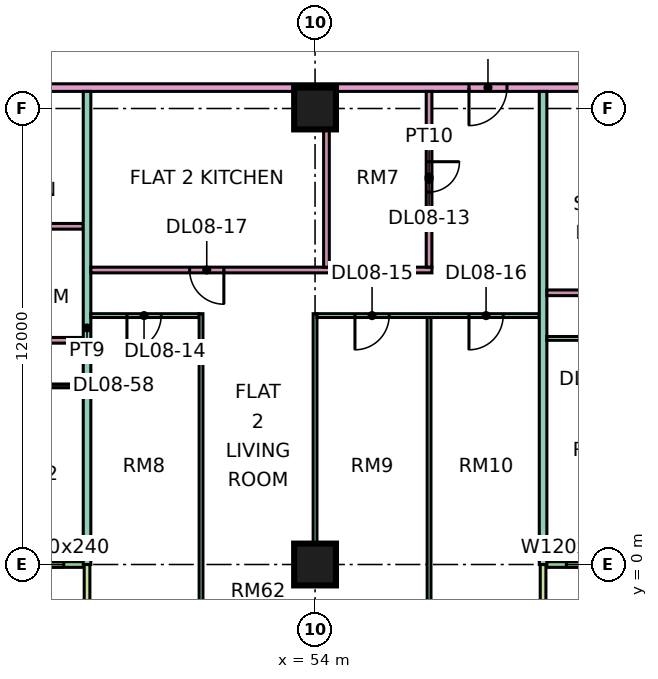
"""IFC4 building model, lengths in metres.
Left out: names, types, materials, properties, quantities, classifications, styles, units other than length and angle.
Written with IfcOpenShell. Run it as: python <this file> out.ifc"""

import sys

from ifc_helpers import new_model, si_unit, direction, frame, frame_2d, origin, origin_2d, place, context, subcontext, project, spatial, rectangle, extrude, element, fill, save


model = new_model("IFC4")
c1 = context("Model", 3, precision=1e-05, world=origin(), true_north=direction((0.0, 1.0)))
c2 = subcontext(c1, "Body", "Model", "MODEL_VIEW")
j1 = project(units=[si_unit("LENGTHUNIT", "METRE"), si_unit("PLANEANGLEUNIT", "RADIAN")], contexts=[c1])
p1 = place(None, origin())
s1 = spatial("IfcSite", under=j1, at=p1, CompositionType="ELEMENT")
p2 = place(p1, origin())
s2 = spatial("IfcBuilding", under=s1, at=p2, CompositionType="ELEMENT")
p3 = place(p2, frame((0.0, 0.0, 45.15)))
s3 = spatial("IfcBuildingStorey", under=s2, at=p3, CompositionType="ELEMENT", Elevation=45.15)
for number, where, z_axis, x_axis in (
    (1, (54.0, 0.0, 0.0), (0.0, 0.0, 1.0), (1.0, 0.0, 0.0)),
    (2, (54.0, 12.0, 0.0), (0.0, 0.0, 1.0), (1.0, 0.0, 0.0)),
):
    element("IfcColumn", number, at=place(p3, frame(where, z_axis=z_axis, x_axis=x_axis)), inside=s3, PredefinedType="COLUMN", context=c2, shape_type="SweptSolid", body=[
        extrude(rectangle(XDim=1.1, YDim=1.1, at=origin_2d()), origin(), (0.0, 0.0, 1.0), 3.75),
    ])
p4 = place(p3, frame((36.075, 0.0, 0.0), z_axis=(0.0, 0.0, 1.0), x_axis=(1.0, 0.0, 0.0)))
e3 = element("IfcWall", 3, at=p4, inside=s3, PredefinedType="SOLIDWALL", context=c2, shape_type="SweptSolid", body=[
    extrude(rectangle(XDim=11.85, YDim=0.15, at=frame_2d((5.925, 0.0))), origin(), (0.0, 0.0, 1.0), 3.35),
])
p5 = place(p4, frame((2.35, 0.0, 0.0)))
e4 = element("IfcOpeningElement", 4, at=p5, cuts=e3, PredefinedType="OPENING", context=c2, shape_type="SweptSolid", body=[
    extrude(rectangle(XDim=1.8, YDim=2.4, at=frame_2d((0.9, 1.2))), frame((0.0, 0.085, 0.0), z_axis=(0.0, -1.0, 0.0), x_axis=(1.0, 0.0, 0.0)), (0.0, 0.0, 1.0), 0.17),
])
p6 = place(p4, frame((6.5, 0.0, 0.45)))
e5 = element("IfcOpeningElement", 5, at=p6, cuts=e3, PredefinedType="OPENING", context=c2, shape_type="SweptSolid", body=[
    extrude(rectangle(XDim=1.2, YDim=2.4, at=frame_2d((0.6, 1.2))), frame((0.0, 0.085, 0.0), z_axis=(0.0, -1.0, 0.0), x_axis=(1.0, 0.0, 0.0)), (0.0, 0.0, 1.0), 0.17),
])
p7 = place(p4, frame((10.113, 0.0, 0.45)))
e6 = element("IfcOpeningElement", 6, at=p7, cuts=e3, PredefinedType="OPENING", context=c2, shape_type="SweptSolid", body=[
    extrude(rectangle(XDim=1.2, YDim=2.4, at=frame_2d((0.6, 1.2))), frame((0.0, 0.085, 0.0), z_axis=(0.0, -1.0, 0.0), x_axis=(1.0, 0.0, 0.0)), (0.0, 0.0, 1.0), 0.17),
])
p8 = place(p3, frame((48.0, -1.5, 0.0), z_axis=(0.0, 0.0, 1.0), x_axis=(0.0, 1.0, 0.0)))
e7 = element("IfcWall", 7, at=p8, inside=s3, PredefinedType="SOLIDWALL", context=c2, shape_type="SweptSolid", body=[
    extrude(rectangle(XDim=1.5, YDim=0.15, at=frame_2d((0.75, 0.0))), origin(), (0.0, 0.0, 1.0), 3.35),
])
p9 = place(p3, frame((60.075, 0.0, 0.0), z_axis=(0.0, 0.0, 1.0), x_axis=(1.0, 0.0, 0.0)))
e8 = element("IfcWall", 8, at=p9, inside=s3, PredefinedType="SOLIDWALL", context=c2, shape_type="SweptSolid", body=[
    extrude(rectangle(XDim=10.35, YDim=0.15, at=frame_2d((5.175, 0.0))), origin(), (0.0, 0.0, 1.0), 3.35),
])
p10 = place(p9, frame((0.538, 0.0, 0.45)))
e9 = element("IfcOpeningElement", 9, at=p10, cuts=e8, PredefinedType="OPENING", context=c2, shape_type="SweptSolid", body=[
    extrude(rectangle(XDim=1.2, YDim=2.4, at=frame_2d((0.6, 1.2))), frame((0.0, 0.085, 0.0), z_axis=(0.0, -1.0, 0.0), x_axis=(1.0, 0.0, 0.0)), (0.0, 0.0, 1.0), 0.17),
])
p11 = place(p9, frame((5.35, 0.0, 0.0)))
e10 = element("IfcOpeningElement", 10, at=p11, cuts=e8, PredefinedType="OPENING", context=c2, shape_type="SweptSolid", body=[
    extrude(rectangle(XDim=1.8, YDim=2.4, at=frame_2d((0.9, 1.2))), frame((0.0, 0.085, 0.0), z_axis=(0.0, -1.0, 0.0), x_axis=(1.0, 0.0, 0.0)), (0.0, 0.0, 1.0), 0.17),
])
p12 = place(p9, frame((9.188, 0.0, 0.45)))
e11 = element("IfcOpeningElement", 11, at=p12, cuts=e8, PredefinedType="OPENING", context=c2, shape_type="SweptSolid", body=[
    extrude(rectangle(XDim=0.9, YDim=2.4, at=frame_2d((0.45, 1.2))), frame((0.0, 0.085, 0.0), z_axis=(0.0, -1.0, 0.0), x_axis=(1.0, 0.0, 0.0)), (0.0, 0.0, 1.0), 0.17),
])
p13 = place(p3, frame((60.0, -1.5, 0.0), z_axis=(0.0, 0.0, 1.0), x_axis=(0.0, 1.0, 0.0)))
e12 = element("IfcWall", 12, at=p13, inside=s3, PredefinedType="SOLIDWALL", context=c2, shape_type="SweptSolid", body=[
    extrude(rectangle(XDim=1.5, YDim=0.15, at=frame_2d((0.75, 0.0))), origin(), (0.0, 0.0, 1.0), 3.35),
])
p14 = place(p3, frame((33.05, 4.7, 0.0), z_axis=(0.0, 0.0, 1.0), x_axis=(1.0, 0.0, 0.0)))
e13 = element("IfcWall", 13, at=p14, inside=s3, PredefinedType="PARTITIONING", context=c2, shape_type="SweptSolid", body=[
    extrude(rectangle(XDim=14.85, YDim=0.1, at=frame_2d((7.425, 0.0))), origin(), (0.0, 0.0, 1.0), 3.35),
])
p15 = place(p14, frame((10.0, 0.0, 0.0)))
e14 = element("IfcOpeningElement", 14, at=p15, cuts=e13, PredefinedType="OPENING", context=c2, shape_type="SweptSolid", body=[
    extrude(rectangle(XDim=0.9, YDim=2.1, at=frame_2d((0.45, 1.05))), frame((0.0, 0.06, 0.0), z_axis=(0.0, -1.0, 0.0), x_axis=(1.0, 0.0, 0.0)), (0.0, 0.0, 1.0), 0.12),
])
p16 = place(p14, frame((13.0, 0.0, 0.0)))
e15 = element("IfcOpeningElement", 15, at=p16, cuts=e13, PredefinedType="OPENING", context=c2, shape_type="SweptSolid", body=[
    extrude(rectangle(XDim=0.9, YDim=2.1, at=frame_2d((0.45, 1.05))), frame((0.0, 0.06, 0.0), z_axis=(0.0, -1.0, 0.0), x_axis=(1.0, 0.0, 0.0)), (0.0, 0.0, 1.0), 0.12),
])
p17 = place(p14, frame((4.0, 0.0, 0.0)))
e16 = element("IfcOpeningElement", 16, at=p17, cuts=e13, PredefinedType="OPENING", context=c2, shape_type="SweptSolid", body=[
    extrude(rectangle(XDim=0.9, YDim=2.1, at=frame_2d((0.45, 1.05))), frame((0.0, 0.06, 0.0), z_axis=(0.0, -1.0, 0.0), x_axis=(1.0, 0.0, 0.0)), (0.0, 0.0, 1.0), 0.12),
])
p18 = place(p3, frame((40.65, 12.55, 0.0), z_axis=(0.0, 0.0, 1.0), x_axis=(1.0, 0.0, 0.0)))
e17 = element("IfcWall", 17, at=p18, inside=s3, PredefinedType="PARTITIONING", context=c2, shape_type="SweptSolid", body=[
    extrude(rectangle(XDim=31.276, YDim=0.2, at=frame_2d((15.638, 0.0))), origin(), (0.0, 0.0, 1.0), 3.35),
])
p19 = place(p18, frame((17.4, 0.0, 0.0)))
e18 = element("IfcOpeningElement", 18, at=p19, cuts=e17, PredefinedType="OPENING", context=c2, shape_type="SweptSolid", body=[
    extrude(rectangle(XDim=1.0, YDim=2.1, at=frame_2d((0.5, 1.05))), frame((0.0, 0.11, 0.0), z_axis=(0.0, -1.0, 0.0), x_axis=(1.0, 0.0, 0.0)), (0.0, 0.0, 1.0), 0.22),
])
p20 = place(p18, frame((26.25, 0.0, 0.0)))
e19 = element("IfcOpeningElement", 19, at=p20, cuts=e17, PredefinedType="OPENING", context=c2, shape_type="SweptSolid", body=[
    extrude(rectangle(XDim=1.0, YDim=2.1, at=frame_2d((0.5, 1.05))), frame((0.0, 0.11, 0.0), z_axis=(0.0, -1.0, 0.0), x_axis=(1.0, 0.0, 0.0)), (0.0, 0.0, 1.0), 0.22),
])
p21 = place(p18, frame((1.05, 0.0, 0.0)))
e20 = element("IfcOpeningElement", 20, at=p21, cuts=e17, PredefinedType="OPENING", context=c2, shape_type="SweptSolid", body=[
    extrude(rectangle(XDim=1.0, YDim=2.1, at=frame_2d((0.5, 1.05))), frame((0.0, 0.11, 0.0), z_axis=(0.0, -1.0, 0.0), x_axis=(1.0, 0.0, 0.0)), (0.0, 0.0, 1.0), 0.22),
])
p22 = place(p3, frame((43.725, 5.9, 0.0), z_axis=(0.0, 0.0, 1.0), x_axis=(1.0, 0.0, 0.0)))
e21 = element("IfcWall", 21, at=p22, inside=s3, PredefinedType="PARTITIONING", context=c2, shape_type="SweptSolid", body=[
    extrude(rectangle(XDim=4.175, YDim=0.15, at=frame_2d((2.087, 0.0))), origin(), (0.0, 0.0, 1.0), 3.35),
])
p23 = place(p22, frame((1.675, 0.0, 0.0)))
e22 = element("IfcOpeningElement", 22, at=p23, cuts=e21, PredefinedType="OPENING", context=c2, shape_type="SweptSolid", body=[
    extrude(rectangle(XDim=0.8, YDim=2.1, at=frame_2d((0.4, 1.05))), frame((0.0, 0.085, 0.0), z_axis=(0.0, -1.0, 0.0), x_axis=(1.0, 0.0, 0.0)), (0.0, 0.0, 1.0), 0.17),
])
p24 = place(p3, frame((43.725, 8.9, 0.0), z_axis=(0.0, 0.0, 1.0), x_axis=(1.0, 0.0, 0.0)))
e23 = element("IfcWall", 23, at=p24, inside=s3, PredefinedType="PARTITIONING", context=c2, shape_type="SweptSolid", body=[
    extrude(rectangle(XDim=4.175, YDim=0.15, at=frame_2d((2.087, 0.0))), origin(), (0.0, 0.0, 1.0), 3.35),
])
p25 = place(p3, frame((48.0, 0.0, 0.0), z_axis=(0.0, 0.0, 1.0), x_axis=(0.0, 1.0, 0.0)))
e24 = element("IfcWall", 24, at=p25, inside=s3, PredefinedType="PARTITIONING", context=c2, shape_type="SweptSolid", body=[
    extrude(rectangle(XDim=12.45, YDim=0.2, at=frame_2d((6.225, 0.0))), origin(), (0.0, 0.0, 1.0), 3.35),
])
p26 = place(p3, frame((48.1, 6.55, 0.0), z_axis=(0.0, 0.0, 1.0), x_axis=(1.0, 0.0, 0.0)))
e25 = element("IfcWall", 25, at=p26, inside=s3, PredefinedType="PARTITIONING", context=c2, shape_type="SweptSolid", body=[
    extrude(rectangle(XDim=2.85, YDim=0.1, at=frame_2d((1.425, 0.0))), origin(), (0.0, 0.0, 1.0), 3.35),
])
p27 = place(p26, frame((0.95, 0.0, 0.0)))
e26 = element("IfcOpeningElement", 26, at=p27, cuts=e25, PredefinedType="OPENING", context=c2, shape_type="SweptSolid", body=[
    extrude(rectangle(XDim=0.9, YDim=2.1, at=frame_2d((0.45, 1.05))), frame((0.0, 0.06, 0.0), z_axis=(0.0, -1.0, 0.0), x_axis=(1.0, 0.0, 0.0)), (0.0, 0.0, 1.0), 0.12),
])
p28 = place(p3, frame((48.1, 7.75, 0.0), z_axis=(0.0, 0.0, 1.0), x_axis=(1.0, 0.0, 0.0)))
e27 = element("IfcWall", 27, at=p28, inside=s3, PredefinedType="PARTITIONING", context=c2, shape_type="SweptSolid", body=[
    extrude(rectangle(XDim=8.975, YDim=0.15, at=frame_2d((4.487, 0.0))), origin(), (0.0, 0.0, 1.0), 3.35),
])
p29 = place(p28, frame((2.6, 0.0, 0.0)))
e28 = element("IfcOpeningElement", 28, at=p29, cuts=e27, PredefinedType="OPENING", context=c2, shape_type="SweptSolid", body=[
    extrude(rectangle(XDim=0.9, YDim=2.1, at=frame_2d((0.45, 1.05))), frame((0.0, 0.085, 0.0), z_axis=(0.0, -1.0, 0.0), x_axis=(1.0, 0.0, 0.0)), (0.0, 0.0, 1.0), 0.17),
])
p30 = place(p3, frame((51.0, -1.35, 0.0), z_axis=(0.0, 0.0, 1.0), x_axis=(0.0, 1.0, 0.0)))
e29 = element("IfcWall", 29, at=p30, inside=s3, PredefinedType="PARTITIONING", context=c2, shape_type="SweptSolid", body=[
    extrude(rectangle(XDim=7.95, YDim=0.1, at=frame_2d((3.975, 0.0))), origin(), (0.0, 0.0, 1.0), 3.35),
])
p31 = place(p3, frame((54.0, 0.0, 0.0), z_axis=(0.0, 0.0, 1.0), x_axis=(0.0, 1.0, 0.0)))
e30 = element("IfcWall", 30, at=p31, inside=s3, PredefinedType="PARTITIONING", context=c2, shape_type="SweptSolid", body=[
    extrude(rectangle(XDim=6.6, YDim=0.1, at=frame_2d((3.3, 0.0))), origin(), (0.0, 0.0, 1.0), 3.35),
])
p32 = place(p3, frame((54.05, 6.55, 0.0), z_axis=(0.0, 0.0, 1.0), x_axis=(1.0, 0.0, 0.0)))
e31 = element("IfcWall", 31, at=p32, inside=s3, PredefinedType="PARTITIONING", context=c2, shape_type="SweptSolid", body=[
    extrude(rectangle(XDim=5.85, YDim=0.1, at=frame_2d((2.925, 0.0))), origin(), (0.0, 0.0, 1.0), 3.35),
])
p33 = place(p32, frame((1.0, 0.0, 0.0)))
e32 = element("IfcOpeningElement", 32, at=p33, cuts=e31, PredefinedType="OPENING", context=c2, shape_type="SweptSolid", body=[
    extrude(rectangle(XDim=0.9, YDim=2.1, at=frame_2d((0.45, 1.05))), frame((0.0, 0.06, 0.0), z_axis=(0.0, -1.0, 0.0), x_axis=(1.0, 0.0, 0.0)), (0.0, 0.0, 1.0), 0.12),
])
p34 = place(p32, frame((4.0, 0.0, 0.0)))
e33 = element("IfcOpeningElement", 33, at=p34, cuts=e31, PredefinedType="OPENING", context=c2, shape_type="SweptSolid", body=[
    extrude(rectangle(XDim=0.9, YDim=2.1, at=frame_2d((0.45, 1.05))), frame((0.0, 0.06, 0.0), z_axis=(0.0, -1.0, 0.0), x_axis=(1.0, 0.0, 0.0)), (0.0, 0.0, 1.0), 0.12),
])
p35 = place(p3, frame((54.3, 7.825, 0.0), z_axis=(0.0, 0.0, 1.0), x_axis=(0.0, 1.0, 0.0)))
e34 = element("IfcWall", 34, at=p35, inside=s3, PredefinedType="PARTITIONING", context=c2, shape_type="SweptSolid", body=[
    extrude(rectangle(XDim=4.625, YDim=0.15, at=frame_2d((2.312, 0.0))), origin(), (0.0, 0.0, 1.0), 3.35),
])
p36 = place(p3, frame((57.0, -1.351, 0.0), z_axis=(0.0, 0.0, 1.0), x_axis=(0.0, 1.0, 0.0)))
e35 = element("IfcWall", 35, at=p36, inside=s3, PredefinedType="PARTITIONING", context=c2, shape_type="SweptSolid", body=[
    extrude(rectangle(XDim=7.851, YDim=0.1, at=frame_2d((3.926, 0.0))), origin(), (0.0, 0.0, 1.0), 3.35),
])
p37 = place(p3, frame((57.0, 7.825, 0.0), z_axis=(0.0, 0.0, 1.0), x_axis=(0.0, 1.0, 0.0)))
e36 = element("IfcWall", 36, at=p37, inside=s3, PredefinedType="PARTITIONING", context=c2, shape_type="SweptSolid", body=[
    extrude(rectangle(XDim=4.625, YDim=0.15, at=frame_2d((2.312, 0.0))), origin(), (0.0, 0.0, 1.0), 3.35),
])
p38 = place(p37, frame((1.975, 0.0, 0.0)))
e37 = element("IfcOpeningElement", 37, at=p38, cuts=e36, PredefinedType="OPENING", context=c2, shape_type="SweptSolid", body=[
    extrude(rectangle(XDim=0.8, YDim=2.1, at=frame_2d((0.4, 1.05))), frame((0.0, 0.085, 0.0), z_axis=(0.0, -1.0, 0.0), x_axis=(1.0, 0.0, 0.0)), (0.0, 0.0, 1.0), 0.17),
])
p39 = place(p3, frame((60.0, 0.0, 0.0), z_axis=(0.0, 0.0, 1.0), x_axis=(0.0, 1.0, 0.0)))
e38 = element("IfcWall", 38, at=p39, inside=s3, PredefinedType="PARTITIONING", context=c2, shape_type="SweptSolid", body=[
    extrude(rectangle(XDim=12.45, YDim=0.2, at=frame_2d((6.225, 0.0))), origin(), (0.0, 0.0, 1.0), 3.35),
])
p40 = place(p3, frame((60.1, 5.95, 0.0), z_axis=(0.0, 0.0, 1.0), x_axis=(1.0, 0.0, 0.0)))
e39 = element("IfcWall", 39, at=p40, inside=s3, PredefinedType="PARTITIONING", context=c2, shape_type="SweptSolid", body=[
    extrude(rectangle(XDim=2.85, YDim=0.1, at=frame_2d((1.425, 0.0))), origin(), (0.0, 0.0, 1.0), 3.35),
])
p41 = place(p40, frame((0.95, 0.0, 0.0)))
e40 = element("IfcOpeningElement", 40, at=p41, cuts=e39, PredefinedType="OPENING", context=c2, shape_type="SweptSolid", body=[
    extrude(rectangle(XDim=0.9, YDim=2.1, at=frame_2d((0.45, 1.05))), frame((0.0, 0.06, 0.0), z_axis=(0.0, -1.0, 0.0), x_axis=(1.0, 0.0, 0.0)), (0.0, 0.0, 1.0), 0.12),
])
p42 = place(p3, frame((60.1, 7.15, 0.0), z_axis=(0.0, 0.0, 1.0), x_axis=(1.0, 0.0, 0.0)))
e41 = element("IfcWall", 41, at=p42, inside=s3, PredefinedType="PARTITIONING", context=c2, shape_type="SweptSolid", body=[
    extrude(rectangle(XDim=5.675, YDim=0.15, at=frame_2d((2.837, 0.0))), origin(), (0.0, 0.0, 1.0), 3.35),
])
p43 = place(p42, frame((1.1, 0.0, 0.0)))
e42 = element("IfcOpeningElement", 42, at=p43, cuts=e41, PredefinedType="OPENING", context=c2, shape_type="SweptSolid", body=[
    extrude(rectangle(XDim=0.9, YDim=2.1, at=frame_2d((0.45, 1.05))), frame((0.0, 0.085, 0.0), z_axis=(0.0, -1.0, 0.0), x_axis=(1.0, 0.0, 0.0)), (0.0, 0.0, 1.0), 0.17),
])
p44 = place(p7, origin())
e43 = element("IfcWindow", 43, at=p44, inside=s3, PartitioningType="SINGLE_PANEL", PredefinedType="WINDOW", context=c2, shape_type="SweptSolid", body=[
    extrude(rectangle(XDim=1.2, YDim=2.4, at=frame_2d((0.6, 1.2))), frame((0.0, 0.03, 0.0), z_axis=(0.0, -1.0, 0.0), x_axis=(1.0, 0.0, 0.0)), (0.0, 0.0, 1.0), 0.06),
])
fill(e6, e43)
p45 = place(p10, origin())
e44 = element("IfcWindow", 44, at=p45, inside=s3, PartitioningType="SINGLE_PANEL", PredefinedType="WINDOW", context=c2, shape_type="SweptSolid", body=[
    extrude(rectangle(XDim=1.2, YDim=2.4, at=frame_2d((0.6, 1.2))), frame((0.0, 0.03, 0.0), z_axis=(0.0, -1.0, 0.0), x_axis=(1.0, 0.0, 0.0)), (0.0, 0.0, 1.0), 0.06),
])
fill(e9, e44)
p46 = place(p38, origin())
e45 = element("IfcDoor", 45, at=p46, inside=s3, OperationType="SINGLE_SWING_RIGHT", PredefinedType="DOOR", context=c2, shape_type="SweptSolid", body=[
    extrude(rectangle(XDim=0.8, YDim=2.1, at=frame_2d((0.4, 1.05))), frame((0.0, 0.025, 0.0), z_axis=(0.0, -1.0, 0.0), x_axis=(1.0, 0.0, 0.0)), (0.0, 0.0, 1.0), 0.05),
])
fill(e37, e45)
p47 = place(p27, frame((0.9, 0.0, 0.0), z_axis=(0.0, 0.0, 1.0), x_axis=(-1.0, 0.0, 0.0)))
e46 = element("IfcDoor", 46, at=p47, inside=s3, OperationType="SINGLE_SWING_LEFT", PredefinedType="DOOR", context=c2, shape_type="SweptSolid", body=[
    extrude(rectangle(XDim=0.9, YDim=2.1, at=frame_2d((0.45, 1.05))), frame((0.0, 0.025, 0.0), z_axis=(0.0, -1.0, 0.0), x_axis=(1.0, 0.0, 0.0)), (0.0, 0.0, 1.0), 0.05),
])
fill(e26, e46)
p48 = place(p33, frame((0.9, 0.0, 0.0), z_axis=(0.0, 0.0, 1.0), x_axis=(-1.0, 0.0, 0.0)))
e47 = element("IfcDoor", 47, at=p48, inside=s3, OperationType="SINGLE_SWING_LEFT", PredefinedType="DOOR", context=c2, shape_type="SweptSolid", body=[
    extrude(rectangle(XDim=0.9, YDim=2.1, at=frame_2d((0.45, 1.05))), frame((0.0, 0.025, 0.0), z_axis=(0.0, -1.0, 0.0), x_axis=(1.0, 0.0, 0.0)), (0.0, 0.0, 1.0), 0.05),
])
fill(e32, e47)
p49 = place(p34, frame((0.9, 0.0, 0.0), z_axis=(0.0, 0.0, 1.0), x_axis=(-1.0, 0.0, 0.0)))
e48 = element("IfcDoor", 48, at=p49, inside=s3, OperationType="SINGLE_SWING_LEFT", PredefinedType="DOOR", context=c2, shape_type="SweptSolid", body=[
    extrude(rectangle(XDim=0.9, YDim=2.1, at=frame_2d((0.45, 1.05))), frame((0.0, 0.025, 0.0), z_axis=(0.0, -1.0, 0.0), x_axis=(1.0, 0.0, 0.0)), (0.0, 0.0, 1.0), 0.05),
])
fill(e33, e48)
p50 = place(p29, origin())
e49 = element("IfcDoor", 49, at=p50, inside=s3, OperationType="SINGLE_SWING_RIGHT", PredefinedType="DOOR", context=c2, shape_type="SweptSolid", body=[
    extrude(rectangle(XDim=0.9, YDim=2.1, at=frame_2d((0.45, 1.05))), frame((0.0, 0.025, 0.0), z_axis=(0.0, -1.0, 0.0), x_axis=(1.0, 0.0, 0.0)), (0.0, 0.0, 1.0), 0.05),
])
fill(e28, e49)
p51 = place(p19, frame((1.0, 0.0, 0.0), z_axis=(0.0, 0.0, 1.0), x_axis=(-1.0, 0.0, 0.0)))
e50 = element("IfcDoor", 50, at=p51, inside=s3, OperationType="SINGLE_SWING_LEFT", PredefinedType="DOOR", context=c2, shape_type="SweptSolid", body=[
    extrude(rectangle(XDim=1.0, YDim=2.1, at=frame_2d((0.5, 1.05))), frame((0.0, 0.025, 0.0), z_axis=(0.0, -1.0, 0.0), x_axis=(1.0, 0.0, 0.0)), (0.0, 0.0, 1.0), 0.05),
])
fill(e18, e50)
save(model, sys.argv[1])
